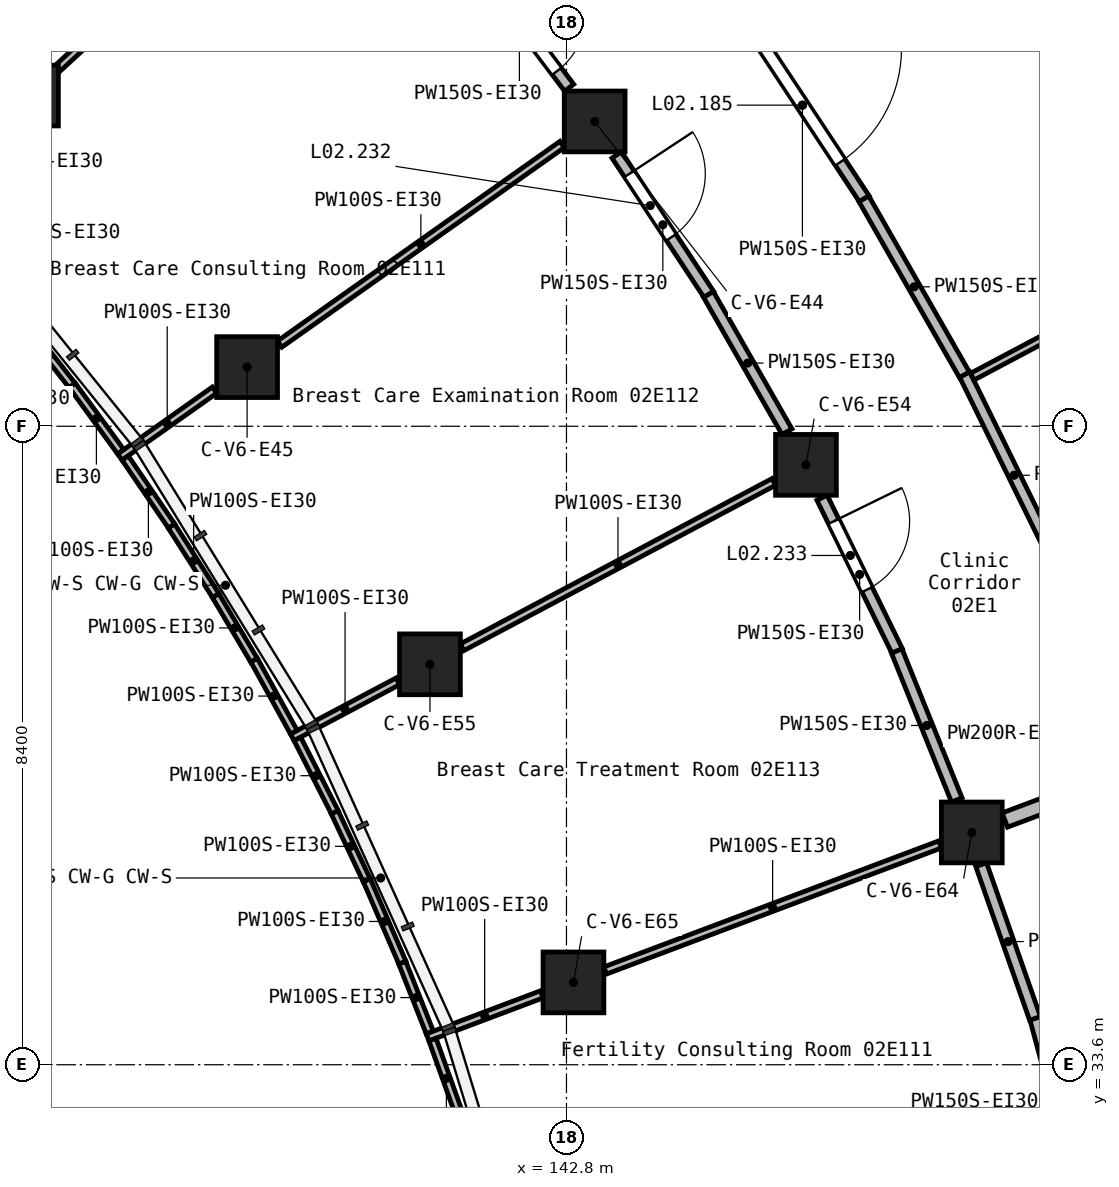
"""IFC4 building model, lengths in metres.
Left out: names, types, materials, properties, quantities, classifications, styles, units other than length and angle.
Written with IfcOpenShell. Run it as: python <this file> out.ifc"""

import sys

from ifc_helpers import new_model, si_unit, direction, frame, frame_2d, origin, origin_2d, place, context, subcontext, project, spatial, rectangle, extrude, element, fill, save


model = new_model("IFC4")
c1 = context("Model", 3, precision=1e-05, world=origin(), true_north=direction((0.0, 1.0)))
c2 = subcontext(c1, "Body", "Model", "MODEL_VIEW")
j1 = project(units=[si_unit("LENGTHUNIT", "METRE"), si_unit("PLANEANGLEUNIT", "RADIAN")], contexts=[c1])
p1 = place(None, origin())
s1 = spatial("IfcSite", under=j1, at=p1, CompositionType="ELEMENT")
p2 = place(p1, origin())
s2 = spatial("IfcBuilding", under=s1, at=p2, CompositionType="ELEMENT")
p3 = place(p2, frame((0.0, 0.0, 12.6)))
s3 = spatial("IfcBuildingStorey", under=s2, at=p3, CompositionType="ELEMENT", Elevation=12.6)
for number, where, z_axis, x_axis in (
    (1, (135.715, 46.351, 0.0), (0.0, 0.0, 1.0), (1.0, 0.0, 0.0)),
    (2, (138.598, 42.778, 0.0), (0.0, 0.0, 1.0), (1.0, 0.0, 0.0)),
    (3, (141.004, 38.868, 0.0), (0.0, 0.0, 1.0), (1.0, 0.0, 0.0)),
    (4, (142.892, 34.683, 0.0), (0.0, 0.0, 1.0), (1.0, 0.0, 0.0)),
    (5, (143.171, 46.01, 0.0), (0.0, 0.0, 1.0), (1.0, 0.0, 0.0)),
    (6, (145.951, 41.492, 0.0), (0.0, 0.0, 1.0), (1.0, 0.0, 0.0)),
    (7, (148.133, 36.656, 0.0), (0.0, 0.0, 1.0), (1.0, 0.0, 0.0)),
):
    element("IfcColumn", number, at=place(p3, frame(where, z_axis=z_axis, x_axis=x_axis)), inside=s3, PredefinedType="COLUMN", context=c2, shape_type="SweptSolid", body=[
        extrude(rectangle(XDim=0.8, YDim=0.8, at=origin_2d()), origin(), (0.0, 0.0, 1.0), 4.2),
    ])
p4 = place(p3, frame((148.567, 36.819, 0.0), z_axis=(0.0, 0.0, 1.0), x_axis=(0.935934561344, 0.352173958268, 0.0)))
e8 = element("IfcWall", 8, at=p4, inside=s3, PredefinedType="SOLIDWALL", context=c2, shape_type="SweptSolid", body=[
    extrude(rectangle(XDim=1.986, YDim=0.2, at=frame_2d((0.993, 0.0))), origin(), (0.0, 0.0, 1.0), 3.85),
])
p5 = place(p3, frame((148.038, 42.683, 0.0), z_axis=(0.0, 0.0, 1.0), x_axis=(0.440200278942, -0.897899612663, 0.0)))
e9 = element("IfcWall", 9, at=p5, inside=s3, PredefinedType="PARTITIONING", context=c2, shape_type="SweptSolid", body=[
    extrude(rectangle(XDim=2.958, YDim=0.15, at=frame_2d((1.479, 0.0))), origin(), (0.0, 0.0, 1.0), 3.85),
])
p6 = place(p3, frame((145.09, 47.458, 0.0), z_axis=(0.0, 0.0, 1.0), x_axis=(0.551018151494, -0.834493257447, 0.0)))
e10 = element("IfcWall", 10, at=p6, inside=s3, PredefinedType="PARTITIONING", context=c2, shape_type="SweptSolid", body=[
    extrude(rectangle(XDim=2.958, YDim=0.15, at=frame_2d((1.479, 0.0))), origin(), (0.0, 0.0, 1.0), 3.85),
])
p7 = place(p6, frame((0.579, 0.0, 0.0)))
e11 = element("IfcOpeningElement", 11, at=p7, cuts=e10, PredefinedType="OPENING", context=c2, shape_type="SweptSolid", body=[
    extrude(rectangle(XDim=1.8, YDim=2.1, at=frame_2d((0.9, 1.05))), frame((0.0, 0.085, 0.0), z_axis=(0.0, -1.0, 0.0), x_axis=(1.0, 0.0, 0.0)), (0.0, 0.0, 1.0), 0.17),
])
p8 = place(p3, frame((146.713, 44.992, 0.0), z_axis=(0.0, 0.0, 1.0), x_axis=(0.49622768999, -0.868192420888, 0.0)))
e12 = element("IfcWall", 12, at=p8, inside=s3, PredefinedType="PARTITIONING", context=c2, shape_type="SweptSolid", body=[
    extrude(rectangle(XDim=2.666, YDim=0.15, at=frame_2d((1.333, 0.0))), origin(), (0.0, 0.0, 1.0), 3.85),
])
p9 = place(p3, frame((146.163, 41.06, 0.0), z_axis=(0.0, 0.0, 1.0), x_axis=(0.439946079235, -0.898024190858, 0.0)))
e13 = element("IfcWall", 13, at=p9, inside=s3, PredefinedType="PARTITIONING", context=c2, shape_type="SweptSolid", body=[
    extrude(rectangle(XDim=2.249, YDim=0.15, at=frame_2d((1.124, 0.0))), origin(), (0.0, 0.0, 1.0), 3.85),
])
p10 = place(p9, frame((0.346, 0.0, 0.0)))
e14 = element("IfcOpeningElement", 14, at=p10, cuts=e13, PredefinedType="OPENING", context=c2, shape_type="SweptSolid", body=[
    extrude(rectangle(XDim=1.0, YDim=2.1, at=frame_2d((0.5, 1.05))), frame((0.0, 0.085, 0.0), z_axis=(0.0, -1.0, 0.0), x_axis=(1.0, 0.0, 0.0)), (0.0, 0.0, 1.0), 0.17),
])
p11 = place(p3, frame((141.526, 48.188, 0.0), z_axis=(0.0, 0.0, 1.0), x_axis=(0.60280129331, -0.797891346477, 0.0)))
e15 = element("IfcWall", 15, at=p11, inside=s3, PredefinedType="PARTITIONING", context=c2, shape_type="SweptSolid", body=[
    extrude(rectangle(XDim=2.172, YDim=0.15, at=frame_2d((1.086, 0.0))), origin(), (0.0, 0.0, 1.0), 3.85),
])
p12 = place(p11, frame((0.902, 0.0, 0.0)))
e16 = element("IfcOpeningElement", 16, at=p12, cuts=e15, PredefinedType="OPENING", context=c2, shape_type="SweptSolid", body=[
    extrude(rectangle(XDim=1.0, YDim=2.1, at=frame_2d((0.5, 1.05))), frame((0.0, 0.085, 0.0), z_axis=(0.0, -1.0, 0.0), x_axis=(1.0, 0.0, 0.0)), (0.0, 0.0, 1.0), 0.17),
])
p13 = place(p3, frame((148.969, 34.215, 0.0), z_axis=(0.0, 0.0, 1.0), x_axis=(0.26138863195, -0.965233641709, 0.0)))
e17 = element("IfcWall", 17, at=p13, inside=s3, PredefinedType="PARTITIONING", context=c2, shape_type="SweptSolid", body=[
    extrude(rectangle(XDim=2.295, YDim=0.15, at=frame_2d((1.147, 0.0))), origin(), (0.0, 0.0, 1.0), 3.85),
])
p14 = place(p13, frame((0.902, 0.0, 0.0)))
e18 = element("IfcOpeningElement", 18, at=p14, cuts=e17, PredefinedType="OPENING", context=c2, shape_type="SweptSolid", body=[
    extrude(rectangle(XDim=1.0, YDim=2.1, at=frame_2d((0.5, 1.05))), frame((0.0, 0.085, 0.0), z_axis=(0.0, -1.0, 0.0), x_axis=(1.0, 0.0, 0.0)), (0.0, 0.0, 1.0), 0.17),
])
p15 = place(p3, frame((143.462, 45.57, 0.0), z_axis=(0.0, 0.0, 1.0), x_axis=(0.550880835548, -0.834583911315, 0.0)))
e19 = element("IfcWall", 19, at=p15, inside=s3, PredefinedType="PARTITIONING", context=c2, shape_type="SweptSolid", body=[
    extrude(rectangle(XDim=2.201, YDim=0.15, at=frame_2d((1.101, 0.0))), origin(), (0.0, 0.0, 1.0), 3.85),
])
p16 = place(p15, frame((0.299, 0.0, 0.0)))
e20 = element("IfcOpeningElement", 20, at=p16, cuts=e19, PredefinedType="OPENING", context=c2, shape_type="SweptSolid", body=[
    extrude(rectangle(XDim=1.0, YDim=2.1, at=frame_2d((0.5, 1.05))), frame((0.0, 0.085, 0.0), z_axis=(0.0, -1.0, 0.0), x_axis=(1.0, 0.0, 0.0)), (0.0, 0.0, 1.0), 0.17),
])
p17 = place(p3, frame((144.668, 43.734, 0.0), z_axis=(0.0, 0.0, 1.0), x_axis=(0.496694973164, -0.867925171679, 0.0)))
e21 = element("IfcWall", 21, at=p17, inside=s3, PredefinedType="PARTITIONING", context=c2, shape_type="SweptSolid", body=[
    extrude(rectangle(XDim=2.08, YDim=0.15, at=frame_2d((1.04, 0.0))), origin(), (0.0, 0.0, 1.0), 3.85),
])
p18 = place(p3, frame((147.145, 39.043, 0.0), z_axis=(0.0, 0.0, 1.0), x_axis=(0.373899406404, -0.927469263043, 0.0)))
e22 = element("IfcWall", 22, at=p18, inside=s3, PredefinedType="PARTITIONING", context=c2, shape_type="SweptSolid", body=[
    extrude(rectangle(XDim=2.113, YDim=0.15, at=frame_2d((1.057, 0.0))), origin(), (0.0, 0.0, 1.0), 3.85),
])
p19 = place(p3, frame((148.257, 36.232, 0.0), z_axis=(0.0, 0.0, 1.0), x_axis=(0.330477279651, -0.943813947574, 0.0)))
e23 = element("IfcWall", 23, at=p19, inside=s3, PredefinedType="PARTITIONING", context=c2, shape_type="SweptSolid", body=[
    extrude(rectangle(XDim=2.143, YDim=0.15, at=frame_2d((1.072, 0.0))), origin(), (0.0, 0.0, 1.0), 3.85),
])
p20 = place(p3, frame((139.193, 37.908, 0.0), z_axis=(0.0, 0.0, 1.0), x_axis=(0.883481589726, 0.468465879884, 0.0)))
e24 = element("IfcWall", 24, at=p20, inside=s3, PredefinedType="PARTITIONING", context=c2, shape_type="SweptSolid", body=[
    extrude(rectangle(XDim=1.571, YDim=0.1, at=frame_2d((0.786, 0.0))), origin(), (0.0, 0.0, 1.0), 3.85),
])
p21 = place(p3, frame((141.427, 39.093, 0.0), z_axis=(0.0, 0.0, 1.0), x_axis=(0.88344099274, 0.46854243388, 0.0)))
e25 = element("IfcWall", 25, at=p21, inside=s3, PredefinedType="PARTITIONING", context=c2, shape_type="SweptSolid", body=[
    extrude(rectangle(XDim=4.642, YDim=0.1, at=frame_2d((2.321, 0.0))), origin(), (0.0, 0.0, 1.0), 3.85),
])
p22 = place(p3, frame((136.924, 41.595, 0.0), z_axis=(0.0, 0.0, 1.0), x_axis=(0.816643847366, 0.577141946629, 0.0)))
e26 = element("IfcWall", 26, at=p22, inside=s3, PredefinedType="PARTITIONING", context=c2, shape_type="SweptSolid", body=[
    extrude(rectangle(XDim=1.525, YDim=0.1, at=frame_2d((0.762, 0.0))), origin(), (0.0, 0.0, 1.0), 3.85),
])
p23 = place(p3, frame((139.026, 43.081, 0.0), z_axis=(0.0, 0.0, 1.0), x_axis=(0.816637661001, 0.577150700108, 0.0)))
e27 = element("IfcWall", 27, at=p23, inside=s3, PredefinedType="PARTITIONING", context=c2, shape_type="SweptSolid", body=[
    extrude(rectangle(XDim=4.551, YDim=0.1, at=frame_2d((2.275, 0.0))), origin(), (0.0, 0.0, 1.0), 3.85),
])
p24 = place(p3, frame((140.973, 33.96, 0.0), z_axis=(0.0, 0.0, 1.0), x_axis=(0.935890679388, 0.35229055655, 0.0)))
e28 = element("IfcWall", 28, at=p24, inside=s3, PredefinedType="PARTITIONING", context=c2, shape_type="SweptSolid", body=[
    extrude(rectangle(XDim=1.604, YDim=0.1, at=frame_2d((0.802, 0.0))), origin(), (0.0, 0.0, 1.0), 3.85),
])
p25 = place(p3, frame((143.309, 34.84, 0.0), z_axis=(0.0, 0.0, 1.0), x_axis=(0.935891610639, 0.352288082591, 0.0)))
e29 = element("IfcWall", 29, at=p25, inside=s3, PredefinedType="PARTITIONING", context=c2, shape_type="SweptSolid", body=[
    extrude(rectangle(XDim=4.708, YDim=0.1, at=frame_2d((2.354, 0.0))), origin(), (0.0, 0.0, 1.0), 3.85),
])
p26 = place(p3, frame((136.111, 46.715, 0.0), z_axis=(0.0, 0.0, 1.0), x_axis=(0.736475017651, 0.676464742892, 0.0)))
e30 = element("IfcWall", 30, at=p26, inside=s3, PredefinedType="PARTITIONING", context=c2, shape_type="SweptSolid", body=[
    extrude(rectangle(XDim=4.524, YDim=0.1, at=frame_2d((2.262, 0.0))), origin(), (0.0, 0.0, 1.0), 3.85),
])
p27 = place(p3, frame((148.139, 42.652, 0.0), z_axis=(0.0, 0.0, 1.0), x_axis=(0.883500310686, 0.468430572249, 0.0)))
e31 = element("IfcWall", 31, at=p27, inside=s3, PredefinedType="PARTITIONING", context=c2, shape_type="SweptSolid", body=[
    extrude(rectangle(XDim=2.645, YDim=0.1, at=frame_2d((1.322, 0.0))), origin(), (0.0, 0.0, 1.0), 3.85),
])
p28 = place(p3, frame((139.26, 37.886, 0.0), z_axis=(0.0, 0.0, 1.0), x_axis=(0.454222477174, -0.890888287738, 0.0)))
e32 = element("IfcWall", 32, at=p28, inside=s3, PredefinedType="PARTITIONING", context=c2, shape_type="SweptSolid", body=[
    extrude(rectangle(XDim=1.085, YDim=0.1, at=frame_2d((0.542, 0.0))), origin(), (0.0, 0.0, 1.0), 3.85),
])
p29 = place(p3, frame((136.994, 41.582, 0.0), z_axis=(0.0, 0.0, 1.0), x_axis=(0.564070256428, -0.825726798532, 0.0)))
e33 = element("IfcWall", 33, at=p29, inside=s3, PredefinedType="PARTITIONING", context=c2, shape_type="SweptSolid", body=[
    extrude(rectangle(XDim=1.084, YDim=0.1, at=frame_2d((0.542, 0.0))), origin(), (0.0, 0.0, 1.0), 3.85),
])
p30 = place(p3, frame((137.603, 40.687, 0.0), z_axis=(0.0, 0.0, 1.0), x_axis=(0.53747146193, -0.843281938388, 0.0)))
e34 = element("IfcWall", 34, at=p30, inside=s3, PredefinedType="PARTITIONING", context=c2, shape_type="SweptSolid", body=[
    extrude(rectangle(XDim=1.086, YDim=0.1, at=frame_2d((0.543, 0.0))), origin(), (0.0, 0.0, 1.0), 3.85),
])
for number, where, z_axis, x_axis in (
    (35, (138.689, 38.925, 0.0), (0.0, 0.0, 1.0), (0.483, -0.876, 0.0)),
    (36, (136.295, 42.54, 0.0), (0.0, 0.0, 1.0), (0.59, -0.807, 0.0)),
):
    element("IfcWall", number, at=place(p3, frame(where, z_axis=z_axis, x_axis=x_axis)), inside=s3, PredefinedType="PARTITIONING", context=c2, shape_type="SweptSolid", body=[
        extrude(rectangle(XDim=1.084, YDim=0.1, at=frame_2d((0.542, 0.0))), origin(), (0.0, 0.0, 1.0), 3.85),
    ])
p31 = place(p3, frame((140.172, 36.029, 0.0), z_axis=(0.0, 0.0, 1.0), x_axis=(0.396479436871, -0.918043602526, 0.0)))
e37 = element("IfcWall", 37, at=p31, inside=s3, PredefinedType="PARTITIONING", context=c2, shape_type="SweptSolid", body=[
    extrude(rectangle(XDim=1.185, YDim=0.1, at=frame_2d((0.592, 0.0))), origin(), (0.0, 0.0, 1.0), 3.85),
])
p32 = place(p3, frame((140.64, 34.942, 0.0), z_axis=(0.0, 0.0, 1.0), x_axis=(0.366901413892, -0.93025983063, 0.0)))
e38 = element("IfcWall", 38, at=p32, inside=s3, PredefinedType="PARTITIONING", context=c2, shape_type="SweptSolid", body=[
    extrude(rectangle(XDim=0.986, YDim=0.1, at=frame_2d((0.493, 0.0))), origin(), (0.0, 0.0, 1.0), 3.85),
])
p33 = place(p3, frame((141.037, 33.93, 0.0), z_axis=(0.0, 0.0, 1.0), x_axis=(0.337434932816, -0.941348854631, 0.0)))
e39 = element("IfcWall", 39, at=p33, inside=s3, PredefinedType="PARTITIONING", context=c2, shape_type="SweptSolid", body=[
    extrude(rectangle(XDim=1.084, YDim=0.1, at=frame_2d((0.542, 0.0))), origin(), (0.0, 0.0, 1.0), 3.85),
])
for number, where, z_axis, x_axis in (
    (40, (139.751, 36.92, 0.0), (0.0, 0.0, 1.0), (0.426, -0.905, 0.0)),
    (41, (135.687, 43.316, 0.0), (0.0, 0.0, 1.0), (0.616, -0.788, 0.0)),
):
    element("IfcWall", number, at=place(p3, frame(where, z_axis=z_axis, x_axis=x_axis)), inside=s3, PredefinedType="PARTITIONING", context=c2, shape_type="SweptSolid", body=[
        extrude(rectangle(XDim=0.987, YDim=0.1, at=frame_2d((0.494, 0.0))), origin(), (0.0, 0.0, 1.0), 3.85),
    ])
p34 = place(p3, frame((138.185, 39.771, 0.0), z_axis=(0.0, 0.0, 1.0), x_axis=(0.51019570921, -0.860058334245, 0.0)))
e42 = element("IfcWall", 42, at=p34, inside=s3, PredefinedType="PARTITIONING", context=c2, shape_type="SweptSolid", body=[
    extrude(rectangle(XDim=0.987, YDim=0.1, at=frame_2d((0.493, 0.0))), origin(), (0.0, 0.0, 1.0), 3.85),
])
p35 = place(p7, frame((1.8, 0.0, 0.0), z_axis=(0.0, 0.0, 1.0), x_axis=(-1.0, 0.0, 0.0)))
e43 = element("IfcDoor", 43, at=p35, inside=s3, OperationType="DOUBLE_DOOR_SINGLE_SWING", PredefinedType="DOOR", context=c2, shape_type="SweptSolid", body=[
    extrude(rectangle(XDim=1.8, YDim=2.1, at=frame_2d((0.9, 1.05))), frame((0.0, 0.025, 0.0), z_axis=(0.0, -1.0, 0.0), x_axis=(1.0, 0.0, 0.0)), (0.0, 0.0, 1.0), 0.05),
])
fill(e11, e43)
p36 = place(p12, frame((1.0, 0.0, 0.0), z_axis=(0.0, 0.0, 1.0), x_axis=(-1.0, 0.0, 0.0)))
e44 = element("IfcDoor", 44, at=p36, inside=s3, OperationType="SINGLE_SWING_LEFT", PredefinedType="DOOR", context=c2, shape_type="SweptSolid", body=[
    extrude(rectangle(XDim=1.0, YDim=2.1, at=frame_2d((0.5, 1.05))), frame((0.0, 0.025, 0.0), z_axis=(0.0, -1.0, 0.0), x_axis=(1.0, 0.0, 0.0)), (0.0, 0.0, 1.0), 0.05),
])
fill(e16, e44)
p37 = place(p16, frame((1.0, 0.0, 0.0), z_axis=(0.0, 0.0, 1.0), x_axis=(-1.0, 0.0, 0.0)))
e45 = element("IfcDoor", 45, at=p37, inside=s3, OperationType="SINGLE_SWING_RIGHT", PredefinedType="DOOR", context=c2, shape_type="SweptSolid", body=[
    extrude(rectangle(XDim=1.0, YDim=2.1, at=frame_2d((0.5, 1.05))), frame((0.0, 0.025, 0.0), z_axis=(0.0, -1.0, 0.0), x_axis=(1.0, 0.0, 0.0)), (0.0, 0.0, 1.0), 0.05),
])
fill(e20, e45)
p38 = place(p10, frame((1.0, 0.0, 0.0), z_axis=(0.0, 0.0, 1.0), x_axis=(-1.0, 0.0, 0.0)))
e46 = element("IfcDoor", 46, at=p38, inside=s3, OperationType="SINGLE_SWING_RIGHT", PredefinedType="DOOR", context=c2, shape_type="SweptSolid", body=[
    extrude(rectangle(XDim=1.0, YDim=2.1, at=frame_2d((0.5, 1.05))), frame((0.0, 0.025, 0.0), z_axis=(0.0, -1.0, 0.0), x_axis=(1.0, 0.0, 0.0)), (0.0, 0.0, 1.0), 0.05),
])
fill(e14, e46)
save(model, sys.argv[1])
